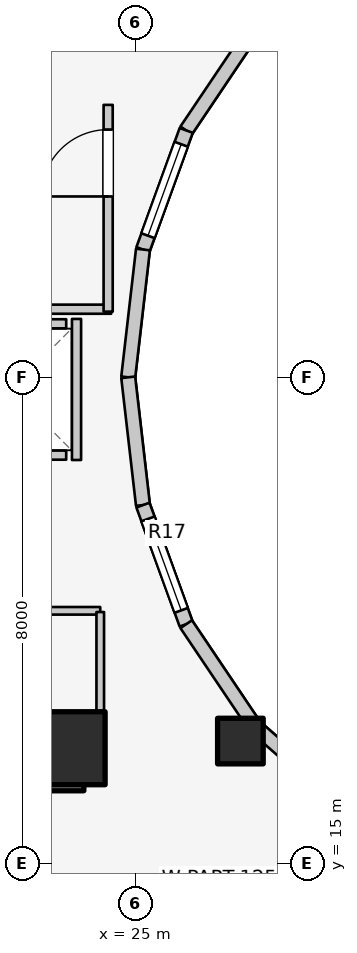
"""IFC4 building model, lengths in metres.
Left out: names, types, materials, properties, quantities, classifications, styles, units other than length and angle.
Written with IfcOpenShell. Run it as: python <this file> out.ifc"""

import sys

from ifc_helpers import new_model, si_unit, direction, frame, frame_2d, origin, origin_2d, place, context, subcontext, project, spatial, rectangle, extrude, element, fill, save


model = new_model("IFC4")
c1 = context("Model", 3, precision=1e-05, world=origin(), true_north=direction((0.0, 1.0)))
c2 = subcontext(c1, "Body", "Model", "MODEL_VIEW")
j1 = project(units=[si_unit("LENGTHUNIT", "METRE"), si_unit("PLANEANGLEUNIT", "RADIAN")], contexts=[c1])
p1 = place(None, origin())
s1 = spatial("IfcSite", under=j1, at=p1, CompositionType="ELEMENT")
p2 = place(p1, origin())
s2 = spatial("IfcBuilding", under=s1, at=p2, CompositionType="ELEMENT")
p3 = place(p2, frame((0.0, 0.0, 162.2)))
s3 = spatial("IfcBuildingStorey", under=s2, at=p3, CompositionType="ELEMENT", Elevation=162.2)
p4 = place(p3, frame((19.65, 16.55, 0.0), z_axis=(0.0, 0.0, 1.0), x_axis=(1.0, 0.0, 0.0)))
e1 = element("IfcWall", 1, at=p4, inside=s3, PredefinedType="SHEAR", context=c2, shape_type="SweptSolid", body=[
    extrude(rectangle(XDim=4.5, YDim=0.7, at=frame_2d((2.25, 0.0))), origin(), (0.0, 0.0, 1.0), 3.1),
])
p5 = place(p3, frame((23.9, 16.9, 0.0), z_axis=(0.0, 0.0, 1.0), x_axis=(1.0, 0.0, 0.0)))
e2 = element("IfcColumn", 2, at=p5, inside=s3, PredefinedType="COLUMN", context=c2, shape_type="SweptSolid", body=[
    extrude(rectangle(XDim=1.2, YDim=1.2, at=origin_2d()), origin(), (0.0, 0.0, 1.0), 3.1),
])
p6 = place(p3, frame((26.725, 17.018, 0.0), z_axis=(0.0, 0.0, 1.0), x_axis=(1.0, 0.0, 0.0)))
e3 = element("IfcColumn", 3, at=p6, inside=s3, PredefinedType="COLUMN", context=c2, shape_type="SweptSolid", body=[
    extrude(rectangle(XDim=0.75, YDim=0.75, at=origin_2d()), origin(), (0.0, 0.0, 1.0), 3.1),
])
p7 = place(p3, frame((26.965, 28.742, 0.0), z_axis=(0.0, 0.0, 1.0), x_axis=(-0.558197800898, -0.829707909492, 0.0)))
e4 = element("IfcWall", 4, at=p7, inside=s3, PredefinedType="STANDARD", context=c2, shape_type="SweptSolid", body=[
    extrude(rectangle(XDim=2.027, YDim=0.23, at=frame_2d((1.013, 0.0))), origin(), (0.0, 0.0, 1.0), 2.16),
])
p8 = place(p3, frame((25.834, 27.06, 0.0), z_axis=(0.0, 0.0, 1.0), x_axis=(-0.341423187295, -0.93990968033, 0.0)))
e5 = element("IfcWall", 5, at=p8, inside=s3, PredefinedType="STANDARD", context=c2, shape_type="SweptSolid", body=[
    extrude(rectangle(XDim=2.084, YDim=0.23, at=frame_2d((1.042, 0.0))), origin(), (0.0, 0.0, 1.0), 2.84),
])
p9 = place(p8, frame((0.242, 0.0, 0.85)))
e6 = element("IfcOpeningElement", 6, at=p9, cuts=e5, PredefinedType="OPENING", context=c2, shape_type="SweptSolid", body=[
    extrude(rectangle(XDim=1.6, YDim=1.65, at=frame_2d((0.8, 0.825))), frame((0.0, 0.125, 0.0), z_axis=(0.0, -1.0, 0.0), x_axis=(1.0, 0.0, 0.0)), (0.0, 0.0, 1.0), 0.25),
])
for number, where, z_axis, x_axis in (
    (7, (25.123, 25.102, 0.0), (0.0, 0.0, 1.0), (-0.115, -0.993, 0.0)),
    (8, (24.88, 23.0, 0.0), (0.0, 0.0, 1.0), (0.115, -0.993, 0.0)),
):
    element("IfcWall", number, at=place(p3, frame(where, z_axis=z_axis, x_axis=x_axis)), inside=s3, PredefinedType="STANDARD", context=c2, shape_type="SweptSolid", body=[
        extrude(rectangle(XDim=2.115, YDim=0.23, at=frame_2d((1.058, 0.0))), origin(), (0.0, 0.0, 1.0), 2.84),
    ])
p10 = place(p3, frame((25.123, 20.898, 0.0), z_axis=(0.0, 0.0, 1.0), x_axis=(0.341423187295, -0.93990968033, 0.0)))
e9 = element("IfcWall", 9, at=p10, inside=s3, PredefinedType="STANDARD", context=c2, shape_type="SweptSolid", body=[
    extrude(rectangle(XDim=2.084, YDim=0.23, at=frame_2d((1.042, 0.0))), origin(), (0.0, 0.0, 1.0), 2.84),
])
p11 = place(p10, frame((0.242, 0.0, 0.85)))
e10 = element("IfcOpeningElement", 10, at=p11, cuts=e9, PredefinedType="OPENING", context=c2, shape_type="SweptSolid", body=[
    extrude(rectangle(XDim=1.6, YDim=1.65, at=frame_2d((0.8, 0.825))), frame((0.0, 0.125, 0.0), z_axis=(0.0, -1.0, 0.0), x_axis=(1.0, 0.0, 0.0)), (0.0, 0.0, 1.0), 0.25),
])
p12 = place(p3, frame((25.834, 18.94, 0.0), z_axis=(0.0, 0.0, 1.0), x_axis=(0.558197800898, -0.829707909492, 0.0)))
e11 = element("IfcWall", 11, at=p12, inside=s3, PredefinedType="STANDARD", context=c2, shape_type="SweptSolid", body=[
    extrude(rectangle(XDim=2.027, YDim=0.23, at=frame_2d((1.013, 0.0))), origin(), (0.0, 0.0, 1.0), 2.16),
])
p13 = place(p3, frame((26.965, 17.258, 0.0), z_axis=(0.0, 0.0, 1.0), x_axis=(0.752576694707, -0.658504607869, 0.0)))
e12 = element("IfcWall", 12, at=p13, inside=s3, PredefinedType="STANDARD", context=c2, shape_type="SweptSolid", body=[
    extrude(rectangle(XDim=1.959, YDim=0.23, at=frame_2d((0.98, 0.0))), origin(), (0.0, 0.0, 1.0), 2.16),
])
for number, where, z_axis, x_axis in (
    (13, (22.04, 21.72, 0.0), (0.0, 0.0, 1.0), (1.0, 0.0, 0.0)),
    (14, (22.04, 23.88, 0.0), (0.0, 0.0, 1.0), (1.0, 0.0, 0.0)),
):
    element("IfcWall", number, at=place(p3, frame(where, z_axis=z_axis, x_axis=x_axis)), inside=s3, PredefinedType="SOLIDWALL", context=c2, shape_type="SweptSolid", body=[
        extrude(rectangle(XDim=1.82, YDim=0.15, at=frame_2d((0.91, 0.0))), origin(), (0.0, 0.0, 1.0), 2.12),
    ])
p14 = place(p3, frame((24.03, 21.64, 0.0), z_axis=(0.0, 0.0, 1.0), x_axis=(0.0, 1.0, 0.0)))
e15 = element("IfcWall", 15, at=p14, inside=s3, PredefinedType="SOLIDWALL", context=c2, shape_type="SweptSolid", body=[
    extrude(rectangle(XDim=2.32, YDim=0.15, at=frame_2d((1.16, 0.0))), origin(), (0.0, 0.0, 1.0), 2.12),
])
p15 = place(p3, frame((19.52, 24.12, 0.0), z_axis=(0.0, 0.0, 1.0), x_axis=(1.0, 0.0, 0.0)))
e16 = element("IfcWall", 16, at=p15, inside=s3, PredefinedType="PARTITIONING", context=c2, shape_type="SweptSolid", body=[
    extrude(rectangle(XDim=5.08, YDim=0.15, at=frame_2d((2.54, 0.0))), origin(), (0.0, 0.0, 1.0), 2.12),
])
p16 = place(p3, frame((24.55, 24.08, 0.0), z_axis=(0.0, 0.0, 1.0), x_axis=(0.0, 1.0, 0.0)))
e17 = element("IfcWall", 17, at=p16, inside=s3, PredefinedType="PARTITIONING", context=c2, shape_type="SweptSolid", body=[
    extrude(rectangle(XDim=3.4, YDim=0.15, at=frame_2d((1.7, 0.0))), origin(), (0.0, 0.0, 1.0), 2.855),
])
p17 = place(p16, frame((1.894, 0.0, 0.0)))
e18 = element("IfcOpeningElement", 18, at=p17, cuts=e17, PredefinedType="OPENING", context=c2, shape_type="SweptSolid", body=[
    extrude(rectangle(XDim=1.1, YDim=2.1, at=frame_2d((0.55, 1.05))), frame((0.0, 0.085, 0.0), z_axis=(0.0, -1.0, 0.0), x_axis=(1.0, 0.0, 0.0)), (0.0, 0.0, 1.0), 0.17),
])
p18 = place(p3, frame((19.55, 19.16, 0.0), z_axis=(0.0, 0.0, 1.0), x_axis=(1.0, 0.0, 0.0)))
e19 = element("IfcWall", 19, at=p18, inside=s3, PredefinedType="PARTITIONING", context=c2, shape_type="SweptSolid", body=[
    extrude(rectangle(XDim=4.87, YDim=0.125, at=frame_2d((2.435, 0.0))), origin(), (0.0, 0.0, 1.0), 2.12),
])
p19 = place(p18, frame((0.55, 0.0, 0.0)))
e20 = element("IfcOpeningElement", 20, at=p19, cuts=e19, PredefinedType="OPENING", context=c2, shape_type="SweptSolid", body=[
    extrude(rectangle(XDim=0.85, YDim=2.05, at=frame_2d((0.425, 1.025))), frame((0.0, 0.073, 0.0), z_axis=(0.0, -1.0, 0.0), x_axis=(1.0, 0.0, 0.0)), (0.0, 0.0, 1.0), 0.145),
])
p20 = place(p3, frame((24.42, 17.1, 0.0), z_axis=(0.0, 0.0, 1.0), x_axis=(0.0, 1.0, 0.0)))
e21 = element("IfcWall", 21, at=p20, inside=s3, PredefinedType="PARTITIONING", context=c2, shape_type="SweptSolid", body=[
    extrude(rectangle(XDim=2.04, YDim=0.125, at=frame_2d((1.02, 0.0))), origin(), (0.0, 0.0, 1.0), 2.232),
])
p21 = place(p3, frame((28.45, 15.985, 0.0), z_axis=(0.0, 0.0, 1.0), x_axis=(-0.525627246902, -0.850714991824, 0.0)))
e22 = element("IfcWall", 22, at=p21, inside=s3, PredefinedType="PARTITIONING", context=c2, shape_type="SweptSolid", body=[
    extrude(rectangle(XDim=2.901, YDim=0.125, at=frame_2d((1.451, 0.0))), origin(), (0.0, 0.0, 1.0), 2.299),
])
p22 = place(p9, origin())
e23 = element("IfcWindow", 23, at=p22, inside=s3, PartitioningType="SINGLE_PANEL", PredefinedType="WINDOW", context=c2, shape_type="SweptSolid", body=[
    extrude(rectangle(XDim=1.6, YDim=1.65, at=frame_2d((0.8, 0.825))), frame((0.0, 0.03, 0.0), z_axis=(0.0, -1.0, 0.0), x_axis=(1.0, 0.0, 0.0)), (0.0, 0.0, 1.0), 0.06),
])
fill(e6, e23)
p23 = place(p11, origin())
e24 = element("IfcWindow", 24, at=p23, inside=s3, PartitioningType="SINGLE_PANEL", PredefinedType="WINDOW", context=c2, shape_type="SweptSolid", body=[
    extrude(rectangle(XDim=1.6, YDim=1.65, at=frame_2d((0.8, 0.825))), frame((0.0, 0.03, 0.0), z_axis=(0.0, -1.0, 0.0), x_axis=(1.0, 0.0, 0.0)), (0.0, 0.0, 1.0), 0.06),
])
fill(e10, e24)
p24 = place(p17, origin())
e25 = element("IfcDoor", 25, at=p24, inside=s3, OperationType="SINGLE_SWING_LEFT", PredefinedType="DOOR", context=c2, shape_type="SweptSolid", body=[
    extrude(rectangle(XDim=1.1, YDim=2.1, at=frame_2d((0.55, 1.05))), frame((0.0, 0.025, 0.0), z_axis=(0.0, -1.0, 0.0), x_axis=(1.0, 0.0, 0.0)), (0.0, 0.0, 1.0), 0.05),
])
fill(e18, e25)
save(model, sys.argv[1])
